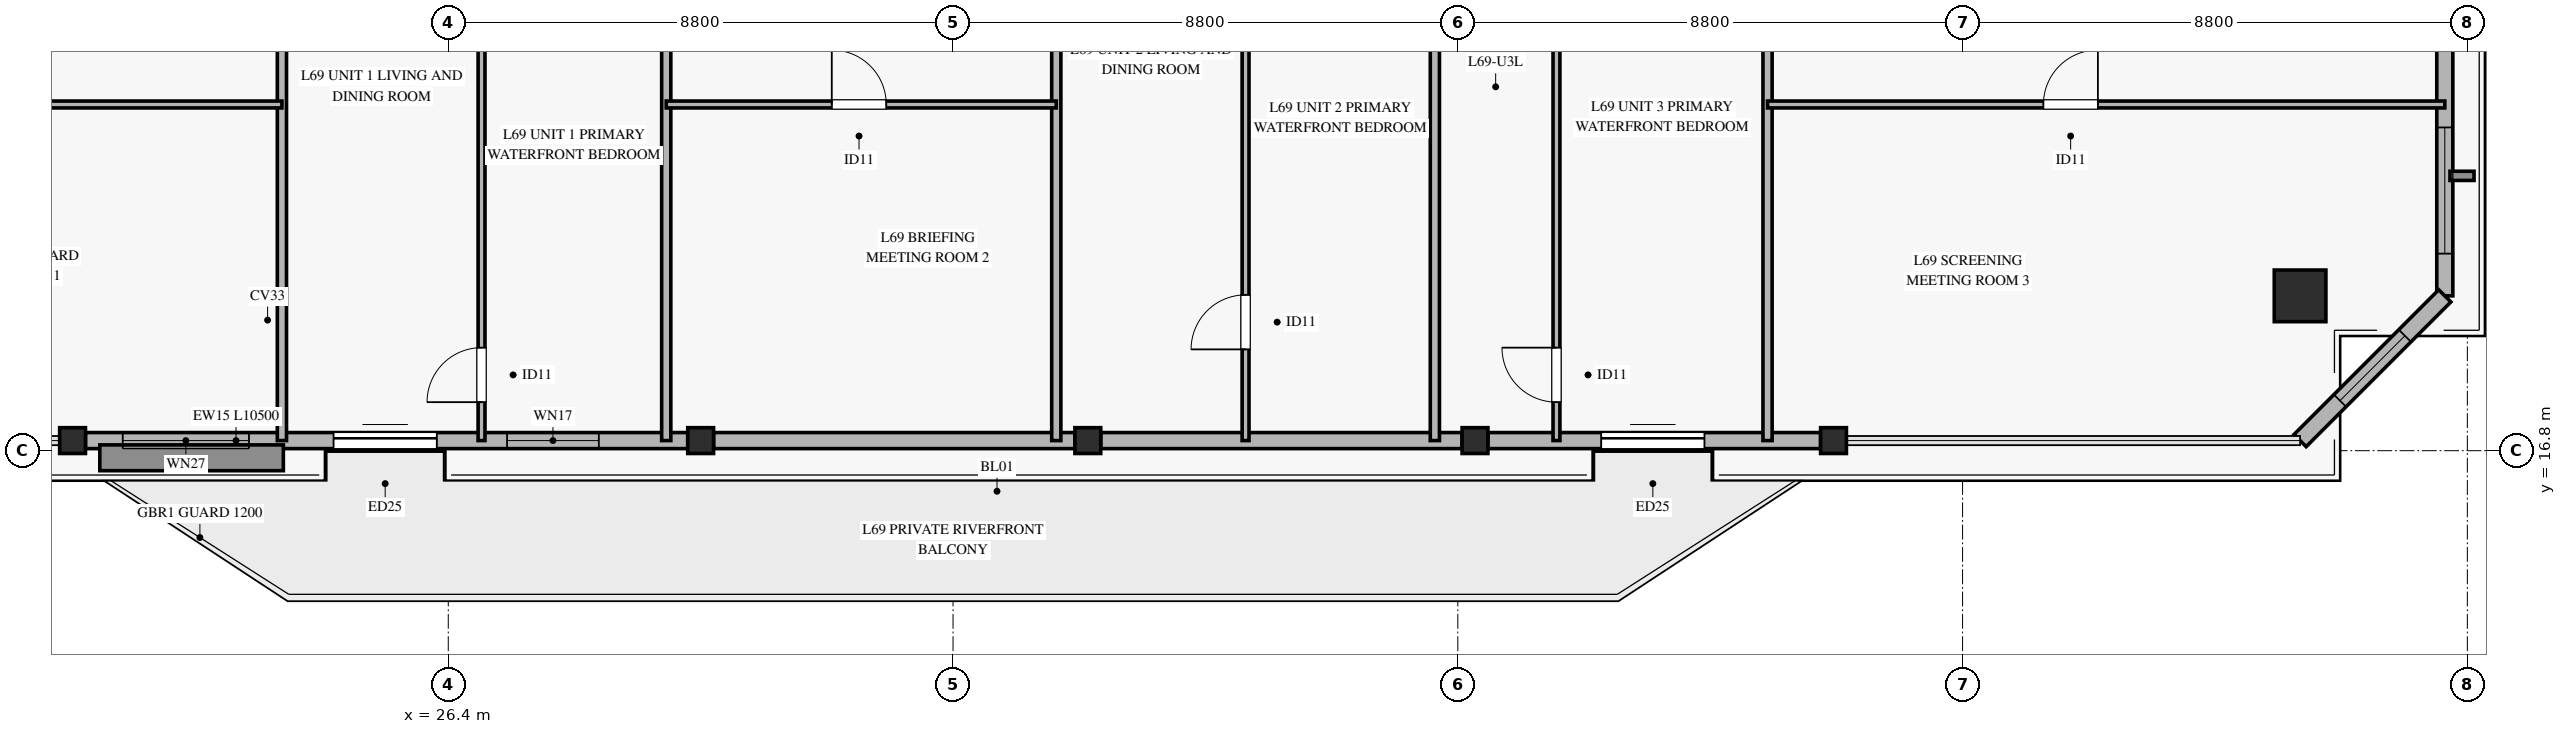
"""IFC4 building model, lengths in metres.
Left out: names, types, materials, properties, quantities, classifications, styles, units other than length and angle.
Written with IfcOpenShell. Run it as: python <this file> out.ifc"""

import sys

from ifc_helpers import new_model, si_unit, direction, frame, frame_2d, origin, origin_2d, place, context, subcontext, project, spatial, rectangle, hollow_rectangle, extrude, source, transform, mapped, element, fill, save


model = new_model("IFC4")
c1 = context("Model", 3, precision=1e-05, world=origin(), true_north=direction((0.0, 1.0)))
c2 = subcontext(c1, "Body", "Model", "MODEL_VIEW")
j1 = project(units=[si_unit("LENGTHUNIT", "METRE"), si_unit("PLANEANGLEUNIT", "RADIAN")], contexts=[c1])
p1 = place(None, origin())
s1 = spatial("IfcSite", under=j1, at=p1, CompositionType="ELEMENT")
p2 = place(p1, origin())
s2 = spatial("IfcBuilding", under=s1, at=p2, CompositionType="ELEMENT")
p3 = place(p2, frame((0.0, 0.0, 268.9)))
s3 = spatial("IfcBuildingStorey", under=s2, at=p3, CompositionType="ELEMENT", Elevation=268.9)
m1 = source(origin(), c2, "Body", "SweptSolid", [
    extrude(hollow_rectangle(XDim=0.9, YDim=0.9, WallThickness=0.04, at=origin_2d()), origin(), (0.0, 0.0, 1.0), 3.185),
])
p4 = place(p3, frame((58.684, 19.499, 0.0), z_axis=(0.0, 0.0, 1.0), x_axis=(1.0, 0.0, 0.0)))
e1 = element("IfcColumn", 1, at=p4, inside=s3, PredefinedType="COLUMN", context=c2, shape_type="MappedRepresentation", body=[
    mapped(m1, transform((0.0, 0.0, 0.0), x_axis=(1.0, 0.0, 0.0), y_axis=(0.0, 1.0, 0.0), z_axis=(0.0, 0.0, 1.0), scale=1.0)),
])
m2 = source(origin(), c2, "Body", "SweptSolid", [
    extrude(hollow_rectangle(XDim=0.45, YDim=0.45, WallThickness=0.022, at=origin_2d()), origin(), (0.0, 0.0, 1.0), 3.185),
])
for number, where, z_axis, x_axis in (
    (2, (19.85, 16.976, 0.0), (0.0, 0.0, 1.0), (1.0, 0.0, 0.0)),
    (3, (30.8, 16.976, 0.0), (0.0, 0.0, 1.0), (1.0, 0.0, 0.0)),
    (4, (37.55, 16.976, 0.0), (0.0, 0.0, 1.0), (1.0, 0.0, 0.0)),
    (5, (44.3, 16.976, 0.0), (0.0, 0.0, 1.0), (1.0, 0.0, 0.0)),
    (6, (50.55, 16.976, 0.0), (0.0, 0.0, 1.0), (1.0, 0.0, 0.0)),
):
    element("IfcColumn", number, at=place(p3, frame(where, z_axis=z_axis, x_axis=x_axis)), inside=s3, PredefinedType="COLUMN", context=c2, shape_type="MappedRepresentation", body=[
        mapped(m2, transform((0.0, 0.0, 0.0), x_axis=(1.0, 0.0, 0.0), y_axis=(0.0, 1.0, 0.0), z_axis=(0.0, 0.0, 1.0), scale=1.0)),
    ])
p5 = place(p3, frame((20.075, 16.976, 0.0), z_axis=(0.0, 0.0, 1.0), x_axis=(1.0, 0.0, 0.0)))
e7 = element("IfcWall", 7, at=p5, inside=s3, PredefinedType="SOLIDWALL", context=c2, shape_type="SweptSolid", body=[
    extrude(rectangle(XDim=10.5, YDim=0.28, at=frame_2d((5.25, 0.0))), origin(), (0.0, 0.0, 1.0), 2.815),
])
p6 = place(p5, frame((4.325, 0.0, 0.0)))
e8 = element("IfcOpeningElement", 8, at=p6, cuts=e7, PredefinedType="OPENING", context=c2, shape_type="SweptSolid", body=[
    extrude(rectangle(XDim=1.8, YDim=2.25, at=frame_2d((0.9, 1.125))), frame((0.0, 0.15, 0.0), z_axis=(0.0, -1.0, 0.0), x_axis=(1.0, 0.0, 0.0)), (0.0, 0.0, 1.0), 0.3),
])
p7 = place(p5, frame((0.65, 0.0, 0.45)))
e9 = element("IfcOpeningElement", 9, at=p7, cuts=e7, PredefinedType="OPENING", context=c2, shape_type="SweptSolid", body=[
    extrude(rectangle(XDim=2.2, YDim=2.1, at=frame_2d((1.1, 1.05))), frame((0.0, 0.15, 0.0), z_axis=(0.0, -1.0, 0.0), x_axis=(1.0, 0.0, 0.0)), (0.0, 0.0, 1.0), 0.3),
])
p8 = place(p5, frame((7.35, 0.0, 0.45)))
e10 = element("IfcOpeningElement", 10, at=p8, cuts=e7, PredefinedType="OPENING", context=c2, shape_type="SweptSolid", body=[
    extrude(rectangle(XDim=1.6, YDim=2.0, at=frame_2d((0.8, 1.0))), frame((0.0, 0.15, 0.0), z_axis=(0.0, -1.0, 0.0), x_axis=(1.0, 0.0, 0.0)), (0.0, 0.0, 1.0), 0.3),
])
for number, where, z_axis, x_axis in (
    (11, (31.025, 16.976, 0.0), (0.0, 0.0, 1.0), (1.0, 0.0, 0.0)),
    (12, (37.775, 16.976, 0.0), (0.0, 0.0, 1.0), (1.0, 0.0, 0.0)),
):
    element("IfcWall", number, at=place(p3, frame(where, z_axis=z_axis, x_axis=x_axis)), inside=s3, PredefinedType="SOLIDWALL", context=c2, shape_type="SweptSolid", body=[
        extrude(rectangle(XDim=6.3, YDim=0.28, at=frame_2d((3.15, 0.0))), origin(), (0.0, 0.0, 1.0), 2.815),
    ])
p9 = place(p3, frame((44.525, 16.976, 0.0), z_axis=(0.0, 0.0, 1.0), x_axis=(1.0, 0.0, 0.0)))
e13 = element("IfcWall", 13, at=p9, inside=s3, PredefinedType="SOLIDWALL", context=c2, shape_type="SweptSolid", body=[
    extrude(rectangle(XDim=5.8, YDim=0.28, at=frame_2d((2.9, 0.0))), origin(), (0.0, 0.0, 1.0), 2.815),
])
p10 = place(p9, frame((1.975, 0.0, 0.0)))
e14 = element("IfcOpeningElement", 14, at=p10, cuts=e13, PredefinedType="OPENING", context=c2, shape_type="SweptSolid", body=[
    extrude(rectangle(XDim=1.8, YDim=2.25, at=frame_2d((0.9, 1.125))), frame((0.0, 0.15, 0.0), z_axis=(0.0, -1.0, 0.0), x_axis=(1.0, 0.0, 0.0)), (0.0, 0.0, 1.0), 0.3),
])
p11 = place(p3, frame((61.207, 19.499, 0.0), z_axis=(0.0, 0.0, 1.0), x_axis=(0.0, 1.0, 0.0)))
e15 = element("IfcWall", 15, at=p11, inside=s3, PredefinedType="SOLIDWALL", context=c2, shape_type="SweptSolid", body=[
    extrude(rectangle(XDim=11.814, YDim=0.28, at=frame_2d((5.907, 0.0))), origin(), (0.0, 0.0, 1.0), 2.815),
])
p12 = place(p11, frame((0.736, 0.0, 0.45)))
e16 = element("IfcOpeningElement", 16, at=p12, cuts=e15, PredefinedType="OPENING", context=c2, shape_type="SweptSolid", body=[
    extrude(rectangle(XDim=2.2, YDim=2.1, at=frame_2d((1.1, 1.05))), frame((0.0, 0.15, 0.0), z_axis=(0.0, -1.0, 0.0), x_axis=(1.0, 0.0, 0.0)), (0.0, 0.0, 1.0), 0.3),
])
p13 = place(p11, frame((6.395, 0.0, 0.45)))
e17 = element("IfcOpeningElement", 17, at=p13, cuts=e15, PredefinedType="OPENING", context=c2, shape_type="SweptSolid", body=[
    extrude(rectangle(XDim=2.2, YDim=2.1, at=frame_2d((1.1, 1.05))), frame((0.0, 0.15, 0.0), z_axis=(0.0, -1.0, 0.0), x_axis=(1.0, 0.0, 0.0)), (0.0, 0.0, 1.0), 0.3),
])
p14 = place(p3, frame((58.684, 16.976, 0.0), z_axis=(0.0, 0.0, 1.0), x_axis=(0.707106781187, 0.707106781187, 0.0)))
e18 = element("IfcWall", 18, at=p14, inside=s3, PredefinedType="SOLIDWALL", context=c2, shape_type="SweptSolid", body=[
    extrude(rectangle(XDim=3.568, YDim=0.3, at=frame_2d((1.784, 0.0))), origin(), (0.0, 0.0, 1.0), 2.815),
])
p15 = place(p14, frame((0.984, 0.0, 0.45)))
e19 = element("IfcOpeningElement", 19, at=p15, cuts=e18, PredefinedType="OPENING", context=c2, shape_type="SweptSolid", body=[
    extrude(rectangle(XDim=1.6, YDim=2.0, at=frame_2d((0.8, 1.0))), frame((0.0, 0.16, 0.0), z_axis=(0.0, -1.0, 0.0), x_axis=(1.0, 0.0, 0.0)), (0.0, 0.0, 1.0), 0.32),
])
for number, where, z_axis, x_axis in (
    (20, (23.5, 16.976, 0.0), (0.0, 0.0, 1.0), (0.0, 1.0, 0.0)),
    (21, (30.2, 16.976, 0.0), (0.0, 0.0, 1.0), (0.0, 1.0, 0.0)),
    (22, (37.0, 16.976, 0.0), (0.0, 0.0, 1.0), (0.0, 1.0, 0.0)),
    (23, (43.6, 16.976, 0.0), (0.0, 0.0, 1.0), (0.0, 1.0, 0.0)),
    (24, (49.4, 16.976, 0.0), (0.0, 0.0, 1.0), (0.0, 1.0, 0.0)),
):
    element("IfcWall", number, at=place(p3, frame(where, z_axis=z_axis, x_axis=x_axis)), inside=s3, PredefinedType="PARTITIONING", context=c2, shape_type="SweptSolid", body=[
        extrude(rectangle(XDim=16.924, YDim=0.16, at=frame_2d((8.462, 0.0))), origin(), (0.0, 0.0, 1.0), 2.77),
    ])
p16 = place(p3, frame((9.194, 22.835, 0.0), z_axis=(0.0, 0.0, 1.0), x_axis=(1.0, 0.0, 0.0)))
e25 = element("IfcWall", 25, at=p16, inside=s3, PredefinedType="PARTITIONING", context=c2, shape_type="SweptSolid", body=[
    extrude(rectangle(XDim=14.306, YDim=0.12, at=frame_2d((7.153, 0.0))), origin(), (0.0, 0.0, 1.0), 2.47),
])
p17 = place(p16, frame((6.008, 0.0, 0.0)))
e26 = element("IfcOpeningElement", 26, at=p17, cuts=e25, PredefinedType="OPENING", context=c2, shape_type="SweptSolid", body=[
    extrude(rectangle(XDim=0.95, YDim=2.1, at=frame_2d((0.475, 1.05))), frame((0.0, 0.07, 0.0), z_axis=(0.0, -1.0, 0.0), x_axis=(1.0, 0.0, 0.0)), (0.0, 0.0, 1.0), 0.14),
])
p18 = place(p3, frame((26.98, 16.976, 0.0), z_axis=(0.0, 0.0, 1.0), x_axis=(0.0, 1.0, 0.0)))
e27 = element("IfcWall", 27, at=p18, inside=s3, PredefinedType="PARTITIONING", context=c2, shape_type="SweptSolid", body=[
    extrude(rectangle(XDim=14.274, YDim=0.12, at=frame_2d((7.137, 0.0))), origin(), (0.0, 0.0, 1.0), 2.77),
])
p19 = place(p18, frame((0.67, 0.0, 0.0)))
e28 = element("IfcOpeningElement", 28, at=p19, cuts=e27, PredefinedType="OPENING", context=c2, shape_type="SweptSolid", body=[
    extrude(rectangle(XDim=0.95, YDim=2.1, at=frame_2d((0.475, 1.05))), frame((0.0, 0.07, 0.0), z_axis=(0.0, -1.0, 0.0), x_axis=(1.0, 0.0, 0.0)), (0.0, 0.0, 1.0), 0.14),
])
p20 = place(p18, frame((10.714, 0.0, 0.0)))
e29 = element("IfcOpeningElement", 29, at=p20, cuts=e27, PredefinedType="OPENING", context=c2, shape_type="SweptSolid", body=[
    extrude(rectangle(XDim=0.95, YDim=2.1, at=frame_2d((0.475, 1.05))), frame((0.0, 0.07, 0.0), z_axis=(0.0, -1.0, 0.0), x_axis=(1.0, 0.0, 0.0)), (0.0, 0.0, 1.0), 0.14),
])
p21 = place(p3, frame((30.2, 22.835, 0.0), z_axis=(0.0, 0.0, 1.0), x_axis=(1.0, 0.0, 0.0)))
e30 = element("IfcWall", 30, at=p21, inside=s3, PredefinedType="PARTITIONING", context=c2, shape_type="SweptSolid", body=[
    extrude(rectangle(XDim=6.8, YDim=0.12, at=frame_2d((3.4, 0.0))), origin(), (0.0, 0.0, 1.0), 2.47),
])
p22 = place(p21, frame((2.886, 0.0, 0.0)))
e31 = element("IfcOpeningElement", 31, at=p22, cuts=e30, PredefinedType="OPENING", context=c2, shape_type="SweptSolid", body=[
    extrude(rectangle(XDim=0.95, YDim=2.1, at=frame_2d((0.475, 1.05))), frame((0.0, 0.07, 0.0), z_axis=(0.0, -1.0, 0.0), x_axis=(1.0, 0.0, 0.0)), (0.0, 0.0, 1.0), 0.14),
])
p23 = place(p3, frame((40.3, 16.976, 0.0), z_axis=(0.0, 0.0, 1.0), x_axis=(0.0, 1.0, 0.0)))
e32 = element("IfcWall", 32, at=p23, inside=s3, PredefinedType="PARTITIONING", context=c2, shape_type="SweptSolid", body=[
    extrude(rectangle(XDim=14.274, YDim=0.12, at=frame_2d((7.137, 0.0))), origin(), (0.0, 0.0, 1.0), 2.77),
])
p24 = place(p23, frame((1.59, 0.0, 0.0)))
e33 = element("IfcOpeningElement", 33, at=p24, cuts=e32, PredefinedType="OPENING", context=c2, shape_type="SweptSolid", body=[
    extrude(rectangle(XDim=0.95, YDim=2.1, at=frame_2d((0.475, 1.05))), frame((0.0, 0.07, 0.0), z_axis=(0.0, -1.0, 0.0), x_axis=(1.0, 0.0, 0.0)), (0.0, 0.0, 1.0), 0.14),
])
p25 = place(p23, frame((10.714, 0.0, 0.0)))
e34 = element("IfcOpeningElement", 34, at=p25, cuts=e32, PredefinedType="OPENING", context=c2, shape_type="SweptSolid", body=[
    extrude(rectangle(XDim=0.95, YDim=2.1, at=frame_2d((0.475, 1.05))), frame((0.0, 0.07, 0.0), z_axis=(0.0, -1.0, 0.0), x_axis=(1.0, 0.0, 0.0)), (0.0, 0.0, 1.0), 0.14),
])
p26 = place(p3, frame((45.72, 16.976, 0.0), z_axis=(0.0, 0.0, 1.0), x_axis=(0.0, 1.0, 0.0)))
e35 = element("IfcWall", 35, at=p26, inside=s3, PredefinedType="PARTITIONING", context=c2, shape_type="SweptSolid", body=[
    extrude(rectangle(XDim=14.274, YDim=0.12, at=frame_2d((7.137, 0.0))), origin(), (0.0, 0.0, 1.0), 2.77),
])
p27 = place(p26, frame((0.67, 0.0, 0.0)))
e36 = element("IfcOpeningElement", 36, at=p27, cuts=e35, PredefinedType="OPENING", context=c2, shape_type="SweptSolid", body=[
    extrude(rectangle(XDim=0.95, YDim=2.1, at=frame_2d((0.475, 1.05))), frame((0.0, 0.07, 0.0), z_axis=(0.0, -1.0, 0.0), x_axis=(1.0, 0.0, 0.0)), (0.0, 0.0, 1.0), 0.14),
])
p28 = place(p26, frame((10.714, 0.0, 0.0)))
e37 = element("IfcOpeningElement", 37, at=p28, cuts=e35, PredefinedType="OPENING", context=c2, shape_type="SweptSolid", body=[
    extrude(rectangle(XDim=0.95, YDim=2.1, at=frame_2d((0.475, 1.05))), frame((0.0, 0.07, 0.0), z_axis=(0.0, -1.0, 0.0), x_axis=(1.0, 0.0, 0.0)), (0.0, 0.0, 1.0), 0.14),
])
p29 = place(p3, frame((49.4, 22.835, 0.0), z_axis=(0.0, 0.0, 1.0), x_axis=(1.0, 0.0, 0.0)))
e38 = element("IfcWall", 38, at=p29, inside=s3, PredefinedType="PARTITIONING", context=c2, shape_type="SweptSolid", body=[
    extrude(rectangle(XDim=11.807, YDim=0.12, at=frame_2d((5.904, 0.0))), origin(), (0.0, 0.0, 1.0), 2.47),
])
p30 = place(p29, frame((4.809, 0.0, 0.0)))
e39 = element("IfcOpeningElement", 39, at=p30, cuts=e38, PredefinedType="OPENING", context=c2, shape_type="SweptSolid", body=[
    extrude(rectangle(XDim=0.95, YDim=2.1, at=frame_2d((0.475, 1.05))), frame((0.0, 0.07, 0.0), z_axis=(0.0, -1.0, 0.0), x_axis=(1.0, 0.0, 0.0)), (0.0, 0.0, 1.0), 0.14),
])
m3 = source(origin(), c2, "Body", "SweptSolid", [
    extrude(rectangle(XDim=1.8, YDim=2.25, at=frame_2d((0.9, 1.125))), frame((0.0, 0.025, 0.0), z_axis=(0.0, -1.0, 0.0), x_axis=(1.0, 0.0, 0.0)), (0.0, 0.0, 1.0), 0.05),
])
p31 = place(p6, origin())
e40 = element("IfcDoor", 40, at=p31, inside=s3, OperationType="SLIDING_TO_LEFT", PredefinedType="DOOR", context=c2, shape_type="MappedRepresentation", body=[
    mapped(m3, transform((0.0, 0.0, 0.0), x_axis=(1.0, 0.0, 0.0), y_axis=(0.0, 1.0, 0.0), z_axis=(0.0, 0.0, 1.0), scale=1.0)),
])
fill(e8, e40)
m4 = source(origin(), c2, "Body", "SweptSolid", [
    extrude(rectangle(XDim=2.2, YDim=2.1, at=frame_2d((1.1, 1.05))), frame((0.0, 0.03, 0.0), z_axis=(0.0, -1.0, 0.0), x_axis=(1.0, 0.0, 0.0)), (0.0, 0.0, 1.0), 0.06),
])
p32 = place(p7, origin())
e41 = element("IfcWindow", 41, at=p32, inside=s3, PartitioningType="SINGLE_PANEL", PredefinedType="WINDOW", context=c2, shape_type="MappedRepresentation", body=[
    mapped(m4, transform((0.0, 0.0, 0.0), x_axis=(1.0, 0.0, 0.0), y_axis=(0.0, 1.0, 0.0), z_axis=(0.0, 0.0, 1.0), scale=1.0)),
])
fill(e9, e41)
m5 = source(origin(), c2, "Body", "SweptSolid", [
    extrude(rectangle(XDim=1.6, YDim=2.0, at=frame_2d((0.8, 1.0))), frame((0.0, 0.03, 0.0), z_axis=(0.0, -1.0, 0.0), x_axis=(1.0, 0.0, 0.0)), (0.0, 0.0, 1.0), 0.06),
])
p33 = place(p8, origin())
e42 = element("IfcWindow", 42, at=p33, inside=s3, PartitioningType="SINGLE_PANEL", PredefinedType="WINDOW", context=c2, shape_type="MappedRepresentation", body=[
    mapped(m5, transform((0.0, 0.0, 0.0), x_axis=(1.0, 0.0, 0.0), y_axis=(0.0, 1.0, 0.0), z_axis=(0.0, 0.0, 1.0), scale=1.0)),
])
fill(e10, e42)
p34 = place(p10, origin())
e43 = element("IfcDoor", 43, at=p34, inside=s3, OperationType="SLIDING_TO_LEFT", PredefinedType="DOOR", context=c2, shape_type="MappedRepresentation", body=[
    mapped(m3, transform((0.0, 0.0, 0.0), x_axis=(1.0, 0.0, 0.0), y_axis=(0.0, 1.0, 0.0), z_axis=(0.0, 0.0, 1.0), scale=1.0)),
])
fill(e14, e43)
p35 = place(p12, origin())
e44 = element("IfcWindow", 44, at=p35, inside=s3, PartitioningType="SINGLE_PANEL", PredefinedType="WINDOW", context=c2, shape_type="MappedRepresentation", body=[
    mapped(m4, transform((0.0, 0.0, 0.0), x_axis=(1.0, 0.0, 0.0), y_axis=(0.0, 1.0, 0.0), z_axis=(0.0, 0.0, 1.0), scale=1.0)),
])
fill(e16, e44)
p36 = place(p15, origin())
e45 = element("IfcWindow", 45, at=p36, inside=s3, PartitioningType="SINGLE_PANEL", PredefinedType="WINDOW", context=c2, shape_type="MappedRepresentation", body=[
    mapped(m5, transform((0.0, 0.0, 0.0), x_axis=(1.0, 0.0, 0.0), y_axis=(0.0, 1.0, 0.0), z_axis=(0.0, 0.0, 1.0), scale=1.0)),
])
fill(e19, e45)
m6 = source(origin(), c2, "Body", "SweptSolid", [
    extrude(rectangle(XDim=0.95, YDim=2.1, at=frame_2d((0.475, 1.05))), frame((0.0, 0.025, 0.0), z_axis=(0.0, -1.0, 0.0), x_axis=(1.0, 0.0, 0.0)), (0.0, 0.0, 1.0), 0.05),
])
p37 = place(p19, origin())
e46 = element("IfcDoor", 46, at=p37, inside=s3, OperationType="SINGLE_SWING_LEFT", PredefinedType="DOOR", context=c2, shape_type="MappedRepresentation", body=[
    mapped(m6, transform((0.0, 0.0, 0.0), x_axis=(1.0, 0.0, 0.0), y_axis=(0.0, 1.0, 0.0), z_axis=(0.0, 0.0, 1.0), scale=1.0)),
])
fill(e28, e46)
p38 = place(p22, origin())
e47 = element("IfcDoor", 47, at=p38, inside=s3, OperationType="SINGLE_SWING_LEFT", PredefinedType="DOOR", context=c2, shape_type="MappedRepresentation", body=[
    mapped(m6, transform((0.0, 0.0, 0.0), x_axis=(1.0, 0.0, 0.0), y_axis=(0.0, 1.0, 0.0), z_axis=(0.0, 0.0, 1.0), scale=1.0)),
])
fill(e31, e47)
p39 = place(p24, origin())
e48 = element("IfcDoor", 48, at=p39, inside=s3, OperationType="SINGLE_SWING_LEFT", PredefinedType="DOOR", context=c2, shape_type="MappedRepresentation", body=[
    mapped(m6, transform((0.0, 0.0, 0.0), x_axis=(1.0, 0.0, 0.0), y_axis=(0.0, 1.0, 0.0), z_axis=(0.0, 0.0, 1.0), scale=1.0)),
])
fill(e33, e48)
p40 = place(p27, origin())
e49 = element("IfcDoor", 49, at=p40, inside=s3, OperationType="SINGLE_SWING_RIGHT", PredefinedType="DOOR", context=c2, shape_type="MappedRepresentation", body=[
    mapped(m6, transform((0.0, 0.0, 0.0), x_axis=(1.0, 0.0, 0.0), y_axis=(0.0, 1.0, 0.0), z_axis=(0.0, 0.0, 1.0), scale=1.0)),
])
fill(e36, e49)
p41 = place(p30, origin())
e50 = element("IfcDoor", 50, at=p41, inside=s3, OperationType="SINGLE_SWING_RIGHT", PredefinedType="DOOR", context=c2, shape_type="MappedRepresentation", body=[
    mapped(m6, transform((0.0, 0.0, 0.0), x_axis=(1.0, 0.0, 0.0), y_axis=(0.0, 1.0, 0.0), z_axis=(0.0, 0.0, 1.0), scale=1.0)),
])
fill(e39, e50)
save(model, sys.argv[1])
